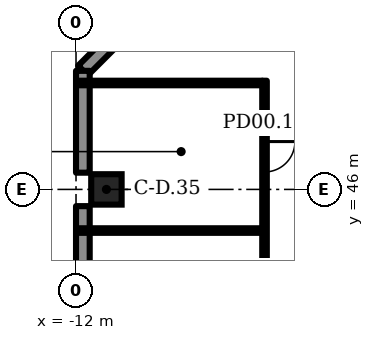
"""IFC4 building model, lengths in metres.
Left out: names, types, materials, properties, quantities, classifications, styles, units other than length and angle.
Written with IfcOpenShell. Run it as: python <this file> out.ifc"""

import sys

from ifc_helpers import new_model, si_unit, direction, frame, frame_2d, origin, origin_2d, place, context, subcontext, project, spatial, rectangle, extrude, element, fill, save


model = new_model("IFC4")
c1 = context("Model", 3, precision=1e-05, world=origin(), true_north=direction((0.0, 1.0)))
c2 = subcontext(c1, "Body", "Model", "MODEL_VIEW")
j1 = project(units=[si_unit("LENGTHUNIT", "METRE"), si_unit("PLANEANGLEUNIT", "RADIAN")], contexts=[c1])
p1 = place(None, origin())
s1 = spatial("IfcSite", under=j1, at=p1, CompositionType="ELEMENT")
p2 = place(p1, origin())
s2 = spatial("IfcBuilding", under=s1, at=p2, CompositionType="ELEMENT")
p3 = place(p2, origin())
s3 = spatial("IfcBuildingStorey", under=s2, at=p3, CompositionType="ELEMENT", Elevation=0.0)
p4 = place(p3, frame((-11.0, 46.0, 0.0), z_axis=(0.0, 0.0, 1.0), x_axis=(1.0, 0.0, 0.0)))
e1 = element("IfcColumn", 1, at=p4, inside=s3, PredefinedType="COLUMN", context=c2, shape_type="SweptSolid", body=[
    extrude(rectangle(XDim=1.0, YDim=1.0, at=origin_2d()), origin(), (0.0, 0.0, 1.0), 8.0),
])
p5 = place(p3, frame((-5.912, 55.77, 0.0), z_axis=(0.0, 0.0, 1.0), x_axis=(-0.707107, -0.707107, 0.0)))
e2 = element("IfcWall", 2, at=p5, inside=s3, PredefinedType="SOLIDWALL", context=c2, shape_type="SweptSolid", body=[
    extrude(rectangle(XDim=8.285, YDim=0.45, at=frame_2d((4.143, 0.0))), origin(), (0.0, 0.0, 1.0), 7.7),
])
p6 = place(p5, frame((2.15, 0.0, 0.0)))
e3 = element("IfcOpeningElement", 3, at=p6, cuts=e2, PredefinedType="OPENING", context=c2, shape_type="SweptSolid", body=[
    extrude(rectangle(XDim=2.4, YDim=2.4, at=frame_2d((1.2, 1.2))), frame((0.0, 0.235, 0.0), z_axis=(0.0, -1.0, 0.0), x_axis=(1.0, 0.0, 0.0)), (0.0, 0.0, 1.0), 0.47),
])
p7 = place(p3, frame((-11.775, 49.9, 0.0), z_axis=(0.0, 0.0, 1.0), x_axis=(0.0, -1.0, 0.0)))
e4 = element("IfcWall", 4, at=p7, inside=s3, PredefinedType="SOLIDWALL", context=c2, shape_type="SweptSolid", body=[
    extrude(rectangle(XDim=3.35, YDim=0.45, at=frame_2d((1.675, 0.0))), origin(), (0.0, 0.0, 1.0), 7.7),
])
p8 = place(p3, frame((-11.775, 45.45, 0.0), z_axis=(0.0, 0.0, 1.0), x_axis=(0.0, -1.0, 0.0)))
e5 = element("IfcWall", 5, at=p8, inside=s3, PredefinedType="SOLIDWALL", context=c2, shape_type="SweptSolid", body=[
    extrude(rectangle(XDim=7.9, YDim=0.45, at=frame_2d((3.95, 0.0))), origin(), (0.0, 0.0, 1.0), 7.7),
])
p9 = place(p3, frame((-5.8, 32.925, 0.0), z_axis=(0.0, 0.0, 1.0), x_axis=(0.0, 1.0, 0.0)))
e6 = element("IfcWall", 6, at=p9, inside=s3, PredefinedType="PARTITIONING", context=c2, shape_type="SweptSolid", body=[
    extrude(rectangle(XDim=16.65, YDim=0.15, at=frame_2d((8.325, 0.0))), origin(), (0.0, 0.0, 1.0), 7.7),
])
p10 = place(p9, frame((2.972, 0.0, 0.0)))
e7 = element("IfcOpeningElement", 7, at=p10, cuts=e6, PredefinedType="OPENING", context=c2, shape_type="SweptSolid", body=[
    extrude(rectangle(XDim=1.0, YDim=2.1, at=frame_2d((0.5, 1.05))), frame((0.0, 0.085, 0.0), z_axis=(0.0, -1.0, 0.0), x_axis=(1.0, 0.0, 0.0)), (0.0, 0.0, 1.0), 0.17),
])
p11 = place(p9, frame((8.796, 0.0, 0.0)))
e8 = element("IfcOpeningElement", 8, at=p11, cuts=e6, PredefinedType="OPENING", context=c2, shape_type="SweptSolid", body=[
    extrude(rectangle(XDim=1.0, YDim=2.1, at=frame_2d((0.5, 1.05))), frame((0.0, 0.085, 0.0), z_axis=(0.0, -1.0, 0.0), x_axis=(1.0, 0.0, 0.0)), (0.0, 0.0, 1.0), 0.17),
])
p12 = place(p9, frame((13.648, 0.0, 0.0)))
e9 = element("IfcOpeningElement", 9, at=p12, cuts=e6, PredefinedType="OPENING", context=c2, shape_type="SweptSolid", body=[
    extrude(rectangle(XDim=1.0, YDim=2.1, at=frame_2d((0.5, 1.05))), frame((0.0, 0.085, 0.0), z_axis=(0.0, -1.0, 0.0), x_axis=(1.0, 0.0, 0.0)), (0.0, 0.0, 1.0), 0.17),
])
for number, where, z_axis, x_axis in (
    (10, (-11.895, 44.647, 0.0), (0.0, 0.0, 1.0), (1.0, 0.0, 0.0)),
    (11, (-11.895, 49.5, 0.0), (0.0, 0.0, 1.0), (1.0, 0.0, 0.0)),
):
    element("IfcWall", number, at=place(p3, frame(where, z_axis=z_axis, x_axis=x_axis)), inside=s3, PredefinedType="PARTITIONING", context=c2, shape_type="SweptSolid", body=[
        extrude(rectangle(XDim=6.02, YDim=0.15, at=frame_2d((3.01, 0.0))), origin(), (0.0, 0.0, 1.0), 7.7),
    ])
p13 = place(p12, origin())
e12 = element("IfcDoor", 12, at=p13, inside=s3, OperationType="SINGLE_SWING_RIGHT", PredefinedType="DOOR", context=c2, shape_type="SweptSolid", body=[
    extrude(rectangle(XDim=1.0, YDim=2.1, at=frame_2d((0.5, 1.05))), frame((0.0, 0.025, 0.0), z_axis=(0.0, -1.0, 0.0), x_axis=(1.0, 0.0, 0.0)), (0.0, 0.0, 1.0), 0.05),
])
fill(e9, e12)
save(model, sys.argv[1])
